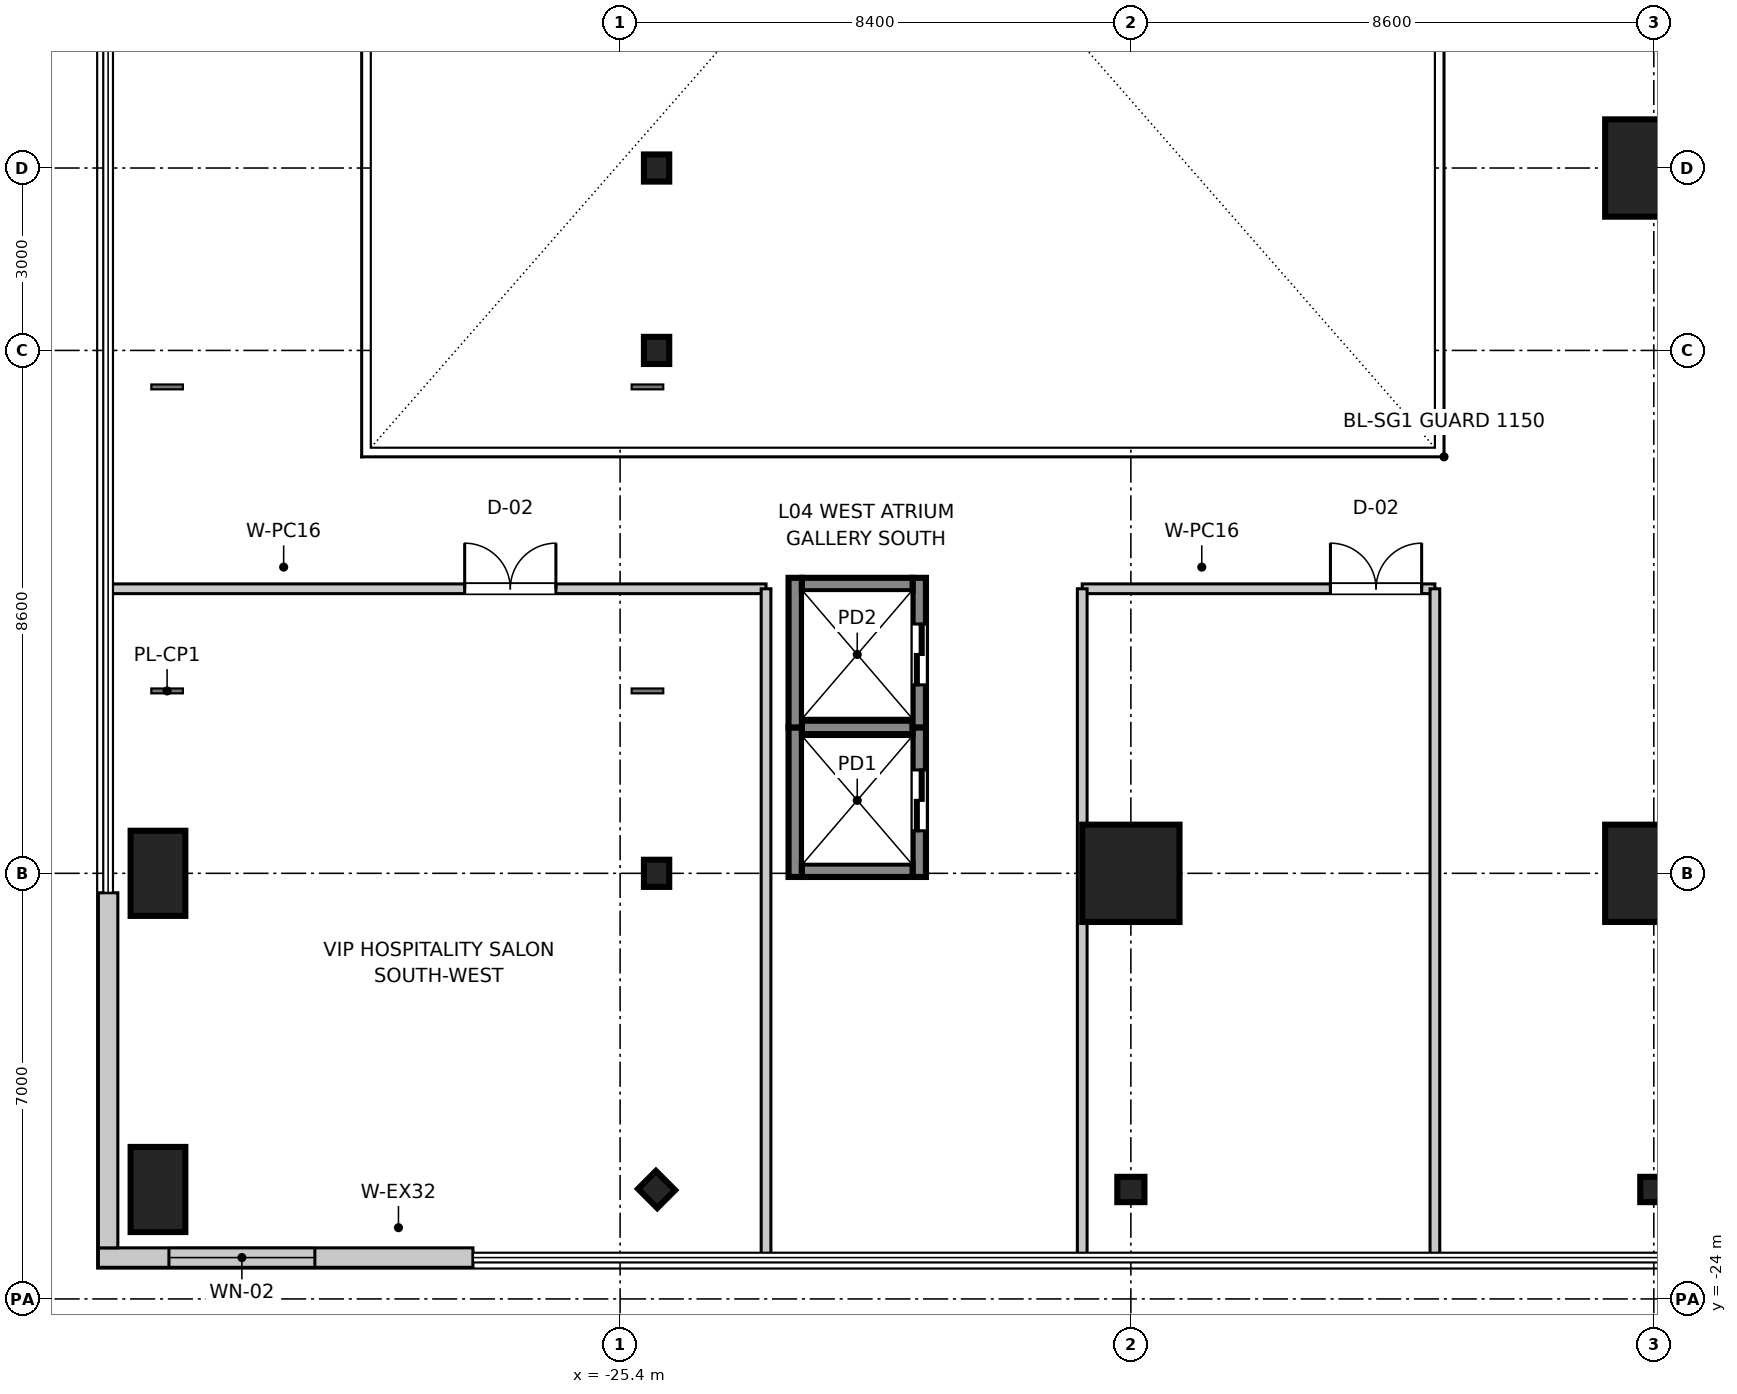
"""IFC4 building model, lengths in metres.
Left out: names, types, materials, properties, quantities, classifications, styles, units other than length and angle.
Written with IfcOpenShell. Run it as: python <this file> out.ifc"""

import sys

from ifc_helpers import new_model, si_unit, direction, frame, frame_2d, origin, origin_2d, place, context, subcontext, project, spatial, rectangle, i_section, extrude, source, transform, mapped, element, fill, save


model = new_model("IFC4")
c1 = context("Model", 3, precision=1e-05, world=origin(), true_north=direction((0.0, 1.0)))
c2 = subcontext(c1, "Body", "Model", "MODEL_VIEW")
j1 = project(units=[si_unit("LENGTHUNIT", "METRE"), si_unit("PLANEANGLEUNIT", "RADIAN")], contexts=[c1])
p1 = place(None, origin())
s1 = spatial("IfcSite", under=j1, at=p1, CompositionType="ELEMENT")
p2 = place(p1, origin())
s2 = spatial("IfcBuilding", under=s1, at=p2, CompositionType="ELEMENT")
p3 = place(p2, frame((0.0, 0.0, 21.6)))
s3 = spatial("IfcBuildingStorey", under=s2, at=p3, CompositionType="ELEMENT", Elevation=21.6)
m1 = source(origin(), c2, "Body", "SweptSolid", [
    extrude(rectangle(XDim=1.6, YDim=1.6, at=origin_2d()), origin(), (0.0, 0.0, 1.0), 5.355),
])
for number, where, z_axis, x_axis in (
    (1, (-17.0, -17.0, 0.0), (0.0, 0.0, 1.0), (1.0, 0.0, 0.0)),
    (2, (-8.4, -17.0, 0.0), (0.0, 0.0, 1.0), (1.0, 0.0, 0.0)),
    (3, (-8.4, -5.4, 0.0), (0.0, 0.0, 1.0), (1.0, 0.0, 0.0)),
):
    element("IfcColumn", number, at=place(p3, frame(where, z_axis=z_axis, x_axis=x_axis)), inside=s3, PredefinedType="COLUMN", context=c2, shape_type="MappedRepresentation", body=[
        mapped(m1, transform((0.0, 0.0, 0.0), scale=1.0)),
    ])
m2 = source(origin(), c2, "Body", "SweptSolid", [
    extrude(rectangle(XDim=0.9, YDim=1.4, at=origin_2d()), origin(), (0.0, 0.0, 1.0), 5.355),
])
for number, where, z_axis, x_axis in (
    (4, (-33.0, -22.2, 0.0), (0.0, 0.0, 1.0), (1.0, 0.0, 0.0)),
    (5, (-33.0, -17.0, 0.0), (0.0, 0.0, 1.0), (1.0, 0.0, 0.0)),
):
    element("IfcColumn", number, at=place(p3, frame(where, z_axis=z_axis, x_axis=x_axis)), inside=s3, PredefinedType="PILASTER", context=c2, shape_type="MappedRepresentation", body=[
        mapped(m2, transform((0.0, 0.0, 0.0), scale=1.0)),
    ])
m3 = source(origin(), c2, "Body", "SweptSolid", [
    extrude(i_section(OverallWidth=0.416, OverallDepth=0.446, WebThickness=0.025, FlangeThickness=0.04, at=origin_2d()), origin(), (0.0, 0.0, 1.0), 5.255),
])
for number, where, z_axis, x_axis in (
    (6, (-24.8, -17.0, 0.0), (0.0, 0.0, 1.0), (1.0, 0.0, 0.0)),
    (7, (-24.8, -8.4, 0.0), (0.0, 0.0, 1.0), (1.0, 0.0, 0.0)),
    (8, (-24.8, -5.4, 0.0), (0.0, 0.0, 1.0), (1.0, 0.0, 0.0)),
    (9, (-17.0, -22.2, 0.0), (0.0, 0.0, 1.0), (0.0, 1.0, 0.0)),
    (10, (-8.4, -22.2, 0.0), (0.0, 0.0, 1.0), (0.0, 1.0, 0.0)),
    (11, (-24.8, -22.2, 0.0), (0.0, 0.0, 1.0), (0.707, 0.707, 0.0)),
):
    element("IfcColumn", number, at=place(p3, frame(where, z_axis=z_axis, x_axis=x_axis)), inside=s3, PredefinedType="COLUMN", context=c2, shape_type="MappedRepresentation", body=[
        mapped(m3, transform((0.0, 0.0, 0.0), scale=1.0)),
    ])
m4 = source(origin(), c2, "Body", "SweptSolid", [
    extrude(rectangle(XDim=2.46, YDim=0.22, at=frame_2d((1.23, 0.0))), origin(), (0.0, 0.0, 1.0), 4.98),
])
p4 = place(p3, frame((-22.52, -17.06, 0.0), z_axis=(0.0, 0.0, 1.0), x_axis=(0.0, 1.0, 0.0)))
e12 = element("IfcWall", 12, at=p4, inside=s3, PredefinedType="SHEAR", context=c2, shape_type="MappedRepresentation", body=[
    mapped(m4, transform((0.0, 0.0, 0.0), scale=1.0)),
])
p5 = place(p3, frame((-20.48, -17.06, 0.0), z_axis=(0.0, 0.0, 1.0), x_axis=(0.0, 1.0, 0.0)))
e13 = element("IfcWall", 13, at=p5, inside=s3, PredefinedType="SHEAR", context=c2, shape_type="MappedRepresentation", body=[
    mapped(m4, transform((0.0, 0.0, 0.0), scale=1.0)),
])
p6 = place(p5, frame((0.76, 0.0, 0.0)))
e14 = element("IfcOpeningElement", 14, at=p6, cuts=e13, PredefinedType="OPENING", context=c2, shape_type="SweptSolid", body=[
    extrude(rectangle(XDim=1.0, YDim=2.2, at=frame_2d((0.5, 1.1))), frame((0.0, 0.12, 0.0), z_axis=(0.0, -1.0, 0.0), x_axis=(1.0, 0.0, 0.0)), (0.0, 0.0, 1.0), 0.24),
])
m5 = source(origin(), c2, "Body", "SweptSolid", [
    extrude(rectangle(XDim=1.82, YDim=0.22, at=frame_2d((0.91, 0.0))), origin(), (0.0, 0.0, 1.0), 4.98),
])
p7 = place(p3, frame((-22.41, -16.95, 0.0), z_axis=(0.0, 0.0, 1.0), x_axis=(1.0, 0.0, 0.0)))
e15 = element("IfcWall", 15, at=p7, inside=s3, PredefinedType="SHEAR", context=c2, shape_type="MappedRepresentation", body=[
    mapped(m5, transform((0.0, 0.0, 0.0), scale=1.0)),
])
m6 = source(origin(), c2, "Body", "SweptSolid", [
    extrude(rectangle(XDim=1.82, YDim=0.22, at=frame_2d((0.91, 0.0))), origin(), (0.0, 0.0, 1.0), 5.4),
])
p8 = place(p3, frame((-22.41, -14.6, 0.0), z_axis=(0.0, 0.0, 1.0), x_axis=(1.0, 0.0, 0.0)))
e16 = element("IfcWall", 16, at=p8, inside=s3, PredefinedType="SHEAR", context=c2, shape_type="MappedRepresentation", body=[
    mapped(m6, transform((0.0, 0.0, 0.0), scale=1.0)),
])
m7 = source(origin(), c2, "Body", "SweptSolid", [
    extrude(rectangle(XDim=2.46, YDim=0.22, at=frame_2d((1.23, 0.0))), origin(), (0.0, 0.0, 1.0), 4.98),
])
p9 = place(p3, frame((-22.52, -14.6, 0.0), z_axis=(0.0, 0.0, 1.0), x_axis=(0.0, 1.0, 0.0)))
e17 = element("IfcWall", 17, at=p9, inside=s3, PredefinedType="SHEAR", context=c2, shape_type="MappedRepresentation", body=[
    mapped(m7, transform((0.0, 0.0, 0.0), scale=1.0)),
])
p10 = place(p3, frame((-20.48, -14.6, 0.0), z_axis=(0.0, 0.0, 1.0), x_axis=(0.0, 1.0, 0.0)))
e18 = element("IfcWall", 18, at=p10, inside=s3, PredefinedType="SHEAR", context=c2, shape_type="MappedRepresentation", body=[
    mapped(m7, transform((0.0, 0.0, 0.0), scale=1.0)),
])
p11 = place(p10, frame((0.7, 0.0, 0.0)))
e19 = element("IfcOpeningElement", 19, at=p11, cuts=e18, PredefinedType="OPENING", context=c2, shape_type="SweptSolid", body=[
    extrude(rectangle(XDim=1.0, YDim=2.2, at=frame_2d((0.5, 1.1))), frame((0.0, 0.12, 0.0), z_axis=(0.0, -1.0, 0.0), x_axis=(1.0, 0.0, 0.0)), (0.0, 0.0, 1.0), 0.24),
])
p12 = place(p3, frame((-22.41, -12.25, 0.0), z_axis=(0.0, 0.0, 1.0), x_axis=(1.0, 0.0, 0.0)))
e20 = element("IfcWall", 20, at=p12, inside=s3, PredefinedType="SHEAR", context=c2, shape_type="MappedRepresentation", body=[
    mapped(m5, transform((0.0, 0.0, 0.0), scale=1.0)),
])
m8 = source(origin(), c2, "Body", "SweptSolid", [
    extrude(rectangle(XDim=6.16, YDim=0.32, at=frame_2d((3.08, 0.0))), origin(), (0.0, 0.0, 1.0), 4.98),
])
p13 = place(p3, frame((-33.98, -23.32, 0.0), z_axis=(0.0, 0.0, 1.0), x_axis=(1.0, 0.0, 0.0)))
e21 = element("IfcWall", 21, at=p13, inside=s3, PredefinedType="STANDARD", context=c2, shape_type="MappedRepresentation", body=[
    mapped(m8, transform((0.0, 0.0, 0.0), scale=1.0)),
])
p14 = place(p13, frame((1.16, 0.0, 0.9)))
e22 = element("IfcOpeningElement", 22, at=p14, cuts=e21, PredefinedType="OPENING", context=c2, shape_type="SweptSolid", body=[
    extrude(rectangle(XDim=2.4, YDim=2.2, at=frame_2d((1.2, 1.1))), frame((0.0, 0.17, 0.0), z_axis=(0.0, -1.0, 0.0), x_axis=(1.0, 0.0, 0.0)), (0.0, 0.0, 1.0), 0.34),
])
m9 = source(origin(), c2, "Body", "SweptSolid", [
    extrude(rectangle(XDim=5.84, YDim=0.32, at=frame_2d((2.92, 0.0))), origin(), (0.0, 0.0, 1.0), 4.98),
])
p15 = place(p3, frame((-33.82, -23.16, 0.0), z_axis=(0.0, 0.0, 1.0), x_axis=(0.0, 1.0, 0.0)))
e23 = element("IfcWall", 23, at=p15, inside=s3, PredefinedType="STANDARD", context=c2, shape_type="MappedRepresentation", body=[
    mapped(m9, transform((0.0, 0.0, 0.0), scale=1.0)),
])
m10 = source(origin(), c2, "Body", "SweptSolid", [
    extrude(rectangle(XDim=10.76, YDim=0.16, at=frame_2d((5.38, 0.0))), origin(), (0.0, 0.0, 1.0), 3.1),
])
p16 = place(p3, frame((-33.76, -12.32, 0.0), z_axis=(0.0, 0.0, 1.0), x_axis=(1.0, 0.0, 0.0)))
e24 = element("IfcWall", 24, at=p16, inside=s3, PredefinedType="PARTITIONING", context=c2, shape_type="MappedRepresentation", body=[
    mapped(m10, transform((0.0, 0.0, 0.0), scale=1.0)),
])
p17 = place(p16, frame((5.804, 0.0, 0.0)))
e25 = element("IfcOpeningElement", 25, at=p17, cuts=e24, PredefinedType="OPENING", context=c2, shape_type="SweptSolid", body=[
    extrude(rectangle(XDim=1.5, YDim=2.15, at=frame_2d((0.75, 1.075))), frame((0.0, 0.09, 0.0), z_axis=(0.0, -1.0, 0.0), x_axis=(1.0, 0.0, 0.0)), (0.0, 0.0, 1.0), 0.18),
])
m11 = source(origin(), c2, "Body", "SweptSolid", [
    extrude(rectangle(XDim=10.94, YDim=0.16, at=frame_2d((5.47, 0.0))), origin(), (0.0, 0.0, 1.0), 3.1),
])
p18 = place(p3, frame((-23.0, -23.26, 0.0), z_axis=(0.0, 0.0, 1.0), x_axis=(0.0, 1.0, 0.0)))
e26 = element("IfcWall", 26, at=p18, inside=s3, PredefinedType="PARTITIONING", context=c2, shape_type="MappedRepresentation", body=[
    mapped(m11, transform((0.0, 0.0, 0.0), scale=1.0)),
])
m12 = source(origin(), c2, "Body", "SweptSolid", [
    extrude(rectangle(XDim=5.8, YDim=0.16, at=frame_2d((2.9, 0.0))), origin(), (0.0, 0.0, 1.0), 3.1),
])
p19 = place(p3, frame((-17.8, -12.32, 0.0), z_axis=(0.0, 0.0, 1.0), x_axis=(1.0, 0.0, 0.0)))
e27 = element("IfcWall", 27, at=p19, inside=s3, PredefinedType="PARTITIONING", context=c2, shape_type="MappedRepresentation", body=[
    mapped(m12, transform((0.0, 0.0, 0.0), scale=1.0)),
])
p20 = place(p19, frame((4.082, 0.0, 0.0)))
e28 = element("IfcOpeningElement", 28, at=p20, cuts=e27, PredefinedType="OPENING", context=c2, shape_type="SweptSolid", body=[
    extrude(rectangle(XDim=1.5, YDim=2.15, at=frame_2d((0.75, 1.075))), frame((0.0, 0.09, 0.0), z_axis=(0.0, -1.0, 0.0), x_axis=(1.0, 0.0, 0.0)), (0.0, 0.0, 1.0), 0.18),
])
for number, where, z_axis, x_axis in (
    (29, (-17.8, -23.26, 0.0), (0.0, 0.0, 1.0), (0.0, 1.0, 0.0)),
    (30, (-12.0, -23.26, 0.0), (0.0, 0.0, 1.0), (0.0, 1.0, 0.0)),
):
    element("IfcWall", number, at=place(p3, frame(where, z_axis=z_axis, x_axis=x_axis)), inside=s3, PredefinedType="PARTITIONING", context=c2, shape_type="MappedRepresentation", body=[
        mapped(m11, transform((0.0, 0.0, 0.0), scale=1.0)),
    ])
m13 = source(origin(), c2, "Body", "SweptSolid", [
    extrude(rectangle(XDim=1.0, YDim=2.2, at=frame_2d((0.5, 1.1))), frame((0.0, 0.025, 0.0), z_axis=(0.0, -1.0, 0.0), x_axis=(1.0, 0.0, 0.0)), (0.0, 0.0, 1.0), 0.05),
])
p21 = place(p6, frame((1.0, 0.0, 0.0), z_axis=(0.0, 0.0, 1.0), x_axis=(-1.0, 0.0, 0.0)))
e31 = element("IfcDoor", 31, at=p21, inside=s3, OperationType="DOUBLE_DOOR_SLIDING", PredefinedType="DOOR", context=c2, shape_type="MappedRepresentation", body=[
    mapped(m13, transform((0.0, 0.0, 0.0), scale=1.0)),
])
fill(e14, e31)
p22 = place(p11, frame((1.0, 0.0, 0.0), z_axis=(0.0, 0.0, 1.0), x_axis=(-1.0, 0.0, 0.0)))
e32 = element("IfcDoor", 32, at=p22, inside=s3, OperationType="DOUBLE_DOOR_SLIDING", PredefinedType="DOOR", context=c2, shape_type="MappedRepresentation", body=[
    mapped(m13, transform((0.0, 0.0, 0.0), scale=1.0)),
])
fill(e19, e32)
m14 = source(origin(), c2, "Body", "SweptSolid", [
    extrude(rectangle(XDim=2.4, YDim=2.2, at=frame_2d((1.2, 1.1))), frame((0.0, 0.03, 0.0), z_axis=(0.0, -1.0, 0.0), x_axis=(1.0, 0.0, 0.0)), (0.0, 0.0, 1.0), 0.06),
])
p23 = place(p14, origin())
e33 = element("IfcWindow", 33, at=p23, inside=s3, PartitioningType="SINGLE_PANEL", PredefinedType="WINDOW", context=c2, shape_type="MappedRepresentation", body=[
    mapped(m14, transform((0.0, 0.0, 0.0), scale=1.0)),
])
fill(e22, e33)
m15 = source(origin(), c2, "Body", "SweptSolid", [
    extrude(rectangle(XDim=1.5, YDim=2.15, at=frame_2d((0.75, 1.075))), frame((0.0, 0.025, 0.0), z_axis=(0.0, -1.0, 0.0), x_axis=(1.0, 0.0, 0.0)), (0.0, 0.0, 1.0), 0.05),
])
p24 = place(p17, frame((1.5, 0.0, 0.0), z_axis=(0.0, 0.0, 1.0), x_axis=(-1.0, 0.0, 0.0)))
e34 = element("IfcDoor", 34, at=p24, inside=s3, OperationType="DOUBLE_DOOR_SINGLE_SWING", PredefinedType="DOOR", context=c2, shape_type="MappedRepresentation", body=[
    mapped(m15, transform((0.0, 0.0, 0.0), scale=1.0)),
])
fill(e25, e34)
p25 = place(p20, frame((1.5, 0.0, 0.0), z_axis=(0.0, 0.0, 1.0), x_axis=(-1.0, 0.0, 0.0)))
e35 = element("IfcDoor", 35, at=p25, inside=s3, OperationType="DOUBLE_DOOR_SINGLE_SWING", PredefinedType="DOOR", context=c2, shape_type="MappedRepresentation", body=[
    mapped(m15, transform((0.0, 0.0, 0.0), scale=1.0)),
])
fill(e28, e35)
save(model, sys.argv[1])
